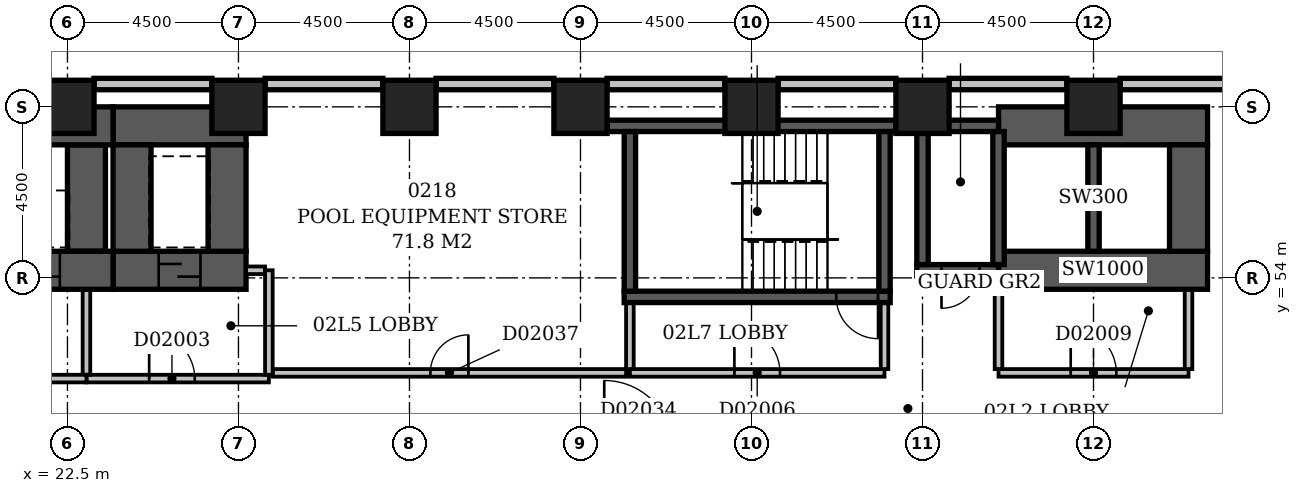
"""IFC4 building model, lengths in metres.
Left out: names, types, materials, properties, quantities, classifications, styles, units other than length and angle.
Written with IfcOpenShell. Run it as: python <this file> out.ifc"""

import sys

from ifc_helpers import new_model, si_unit, direction, frame, frame_2d, origin, origin_2d, place, context, subcontext, project, spatial, rectangle, extrude, element, fill, save


model = new_model("IFC4")
c1 = context("Model", 3, precision=1e-05, world=origin(), true_north=direction((0.0, 1.0)))
c2 = subcontext(c1, "Body", "Model", "MODEL_VIEW")
j1 = project(units=[si_unit("LENGTHUNIT", "METRE"), si_unit("PLANEANGLEUNIT", "RADIAN")], contexts=[c1])
p1 = place(None, origin())
s1 = spatial("IfcSite", under=j1, at=p1, CompositionType="ELEMENT")
p2 = place(p1, origin())
s2 = spatial("IfcBuilding", under=s1, at=p2, CompositionType="ELEMENT")
p3 = place(p2, frame((0.0, 0.0, 14.0)))
s3 = spatial("IfcBuildingStorey", under=s2, at=p3, CompositionType="ELEMENT", Elevation=14.0)
p4 = place(p3, frame((7.35, 54.2, -0.4), z_axis=(0.0, 0.0, 1.0), x_axis=(1.0, 0.0, 0.0)))
e1 = element("IfcWall", 1, at=p4, inside=s3, PredefinedType="SHEAR", context=c2, shape_type="SweptSolid", body=[
    extrude(rectangle(XDim=16.35, YDim=1.0, at=frame_2d((8.175, 0.0))), origin(), (0.0, 0.0, 1.0), 5.0),
])
p5 = place(p4, frame((1.35, 0.0, 0.4)))
e2 = element("IfcOpeningElement", 2, at=p5, cuts=e1, PredefinedType="OPENING", context=c2, shape_type="SweptSolid", body=[
    extrude(rectangle(XDim=1.1, YDim=2.1, at=frame_2d((0.55, 1.05))), frame((0.0, 0.512, 0.0), z_axis=(0.0, -1.0, 0.0), x_axis=(1.0, 0.0, 0.0)), (0.0, 0.0, 1.0), 1.024),
])
p6 = place(p4, frame((3.85, 0.0, 0.4)))
e3 = element("IfcOpeningElement", 3, at=p6, cuts=e1, PredefinedType="OPENING", context=c2, shape_type="SweptSolid", body=[
    extrude(rectangle(XDim=1.1, YDim=2.1, at=frame_2d((0.55, 1.05))), frame((0.0, 0.512, 0.0), z_axis=(0.0, -1.0, 0.0), x_axis=(1.0, 0.0, 0.0)), (0.0, 0.0, 1.0), 1.024),
])
p7 = place(p4, frame((6.35, 0.0, 0.4)))
e4 = element("IfcOpeningElement", 4, at=p7, cuts=e1, PredefinedType="OPENING", context=c2, shape_type="SweptSolid", body=[
    extrude(rectangle(XDim=1.1, YDim=2.1, at=frame_2d((0.55, 1.05))), frame((0.0, 0.512, 0.0), z_axis=(0.0, -1.0, 0.0), x_axis=(1.0, 0.0, 0.0)), (0.0, 0.0, 1.0), 1.024),
])
p8 = place(p4, frame((8.85, 0.0, 0.4)))
e5 = element("IfcOpeningElement", 5, at=p8, cuts=e1, PredefinedType="OPENING", context=c2, shape_type="SweptSolid", body=[
    extrude(rectangle(XDim=1.1, YDim=2.1, at=frame_2d((0.55, 1.05))), frame((0.0, 0.512, 0.0), z_axis=(0.0, -1.0, 0.0), x_axis=(1.0, 0.0, 0.0)), (0.0, 0.0, 1.0), 1.024),
])
p9 = place(p4, frame((11.35, 0.0, 0.4)))
e6 = element("IfcOpeningElement", 6, at=p9, cuts=e1, PredefinedType="OPENING", context=c2, shape_type="SweptSolid", body=[
    extrude(rectangle(XDim=1.1, YDim=2.1, at=frame_2d((0.55, 1.05))), frame((0.0, 0.512, 0.0), z_axis=(0.0, -1.0, 0.0), x_axis=(1.0, 0.0, 0.0)), (0.0, 0.0, 1.0), 1.024),
])
p10 = place(p4, frame((13.85, 0.0, 0.4)))
e7 = element("IfcOpeningElement", 7, at=p10, cuts=e1, PredefinedType="OPENING", context=c2, shape_type="SweptSolid", body=[
    extrude(rectangle(XDim=1.1, YDim=2.1, at=frame_2d((0.55, 1.05))), frame((0.0, 0.512, 0.0), z_axis=(0.0, -1.0, 0.0), x_axis=(1.0, 0.0, 0.0)), (0.0, 0.0, 1.0), 1.024),
])
p11 = place(p3, frame((7.35, 58.0, -0.4), z_axis=(0.0, 0.0, 1.0), x_axis=(1.0, 0.0, 0.0)))
e8 = element("IfcWall", 8, at=p11, inside=s3, PredefinedType="SHEAR", context=c2, shape_type="SweptSolid", body=[
    extrude(rectangle(XDim=16.35, YDim=1.0, at=frame_2d((8.175, 0.0))), origin(), (0.0, 0.0, 1.0), 5.0),
])
p12 = place(p3, frame((23.0, 54.7, -0.4), z_axis=(0.0, 0.0, 1.0), x_axis=(0.0, 1.0, 0.0)))
e9 = element("IfcWall", 9, at=p12, inside=s3, PredefinedType="SHEAR", context=c2, shape_type="SweptSolid", body=[
    extrude(rectangle(XDim=2.8, YDim=1.0, at=frame_2d((1.4, 0.0))), origin(), (0.0, 0.0, 1.0), 5.0),
])
p13 = place(p3, frame((23.7, 54.2, -0.4), z_axis=(0.0, 0.0, 1.0), x_axis=(1.0, 0.0, 0.0)))
e10 = element("IfcWall", 10, at=p13, inside=s3, PredefinedType="SHEAR", context=c2, shape_type="SweptSolid", body=[
    extrude(rectangle(XDim=3.5, YDim=1.0, at=frame_2d((1.75, 0.0))), origin(), (0.0, 0.0, 1.0), 5.0),
])
p14 = place(p13, frame((1.2, 0.0, 0.4)))
e11 = element("IfcOpeningElement", 11, at=p14, cuts=e10, PredefinedType="OPENING", context=c2, shape_type="SweptSolid", body=[
    extrude(rectangle(XDim=1.1, YDim=2.1, at=frame_2d((0.55, 1.05))), frame((0.0, 0.512, 0.0), z_axis=(0.0, -1.0, 0.0), x_axis=(1.0, 0.0, 0.0)), (0.0, 0.0, 1.0), 1.024),
])
p15 = place(p3, frame((23.7, 58.0, -0.4), z_axis=(0.0, 0.0, 1.0), x_axis=(1.0, 0.0, 0.0)))
e12 = element("IfcWall", 12, at=p15, inside=s3, PredefinedType="SHEAR", context=c2, shape_type="SweptSolid", body=[
    extrude(rectangle(XDim=3.5, YDim=1.0, at=frame_2d((1.75, 0.0))), origin(), (0.0, 0.0, 1.0), 5.0),
])
for number, where, z_axis, x_axis in (
    (13, (24.2, 54.7, -0.4), (0.0, 0.0, 1.0), (0.0, 1.0, 0.0)),
    (14, (26.7, 54.7, -0.4), (0.0, 0.0, 1.0), (0.0, 1.0, 0.0)),
):
    element("IfcWall", number, at=place(p3, frame(where, z_axis=z_axis, x_axis=x_axis)), inside=s3, PredefinedType="SHEAR", context=c2, shape_type="SweptSolid", body=[
        extrude(rectangle(XDim=2.8, YDim=1.0, at=frame_2d((1.4, 0.0))), origin(), (0.0, 0.0, 1.0), 5.0),
    ])
p16 = place(p3, frame((36.7, 58.0, -0.4), z_axis=(0.0, 0.0, 1.0), x_axis=(1.0, 0.0, 0.0)))
e15 = element("IfcWall", 15, at=p16, inside=s3, PredefinedType="SHEAR", context=c2, shape_type="SweptSolid", body=[
    extrude(rectangle(XDim=7.6, YDim=0.3, at=frame_2d((3.8, 0.0))), origin(), (0.0, 0.0, 1.0), 5.0),
])
p17 = place(p3, frame((37.15, 53.5, -0.4), z_axis=(0.0, 0.0, 1.0), x_axis=(1.0, 0.0, 0.0)))
e16 = element("IfcWall", 16, at=p17, inside=s3, PredefinedType="SHEAR", context=c2, shape_type="SweptSolid", body=[
    extrude(rectangle(XDim=7.0, YDim=0.3, at=frame_2d((3.5, 0.0))), origin(), (0.0, 0.0, 1.0), 5.0),
])
p18 = place(p17, frame((5.58, 0.0, 0.4)))
e17 = element("IfcOpeningElement", 17, at=p18, cuts=e16, PredefinedType="OPENING", context=c2, shape_type="SweptSolid", body=[
    extrude(rectangle(XDim=1.1, YDim=2.1, at=frame_2d((0.55, 1.05))), frame((0.0, 0.162, 0.0), z_axis=(0.0, -1.0, 0.0), x_axis=(1.0, 0.0, 0.0)), (0.0, 0.0, 1.0), 0.324),
])
for number, where, z_axis, x_axis in (
    (18, (37.3, 53.65, -0.4), (0.0, 0.0, 1.0), (0.0, 1.0, 0.0)),
    (19, (44.0, 53.65, -0.4), (0.0, 0.0, 1.0), (0.0, 1.0, 0.0)),
):
    element("IfcWall", number, at=place(p3, frame(where, z_axis=z_axis, x_axis=x_axis)), inside=s3, PredefinedType="SHEAR", context=c2, shape_type="SweptSolid", body=[
        extrude(rectangle(XDim=4.2, YDim=0.3, at=frame_2d((2.1, 0.0))), origin(), (0.0, 0.0, 1.0), 5.0),
    ])
p19 = place(p3, frame((44.85, 54.2, -0.4), z_axis=(0.0, 0.0, 1.0), x_axis=(1.0, 0.0, 0.0)))
e20 = element("IfcWall", 20, at=p19, inside=s3, PredefinedType="SHEAR", context=c2, shape_type="SweptSolid", body=[
    extrude(rectangle(XDim=2.15, YDim=0.3, at=frame_2d((1.075, 0.0))), origin(), (0.0, 0.0, 1.0), 5.0),
])
p20 = place(p19, frame((0.65, 0.0, 0.4)))
e21 = element("IfcOpeningElement", 21, at=p20, cuts=e20, PredefinedType="OPENING", context=c2, shape_type="SweptSolid", body=[
    extrude(rectangle(XDim=1.0, YDim=2.1, at=frame_2d((0.5, 1.05))), frame((0.0, 0.162, 0.0), z_axis=(0.0, -1.0, 0.0), x_axis=(1.0, 0.0, 0.0)), (0.0, 0.0, 1.0), 0.324),
])
p21 = place(p3, frame((44.85, 58.0, -0.4), z_axis=(0.0, 0.0, 1.0), x_axis=(1.0, 0.0, 0.0)))
e22 = element("IfcWall", 22, at=p21, inside=s3, PredefinedType="SHEAR", context=c2, shape_type="SweptSolid", body=[
    extrude(rectangle(XDim=2.15, YDim=0.3, at=frame_2d((1.075, 0.0))), origin(), (0.0, 0.0, 1.0), 5.0),
])
p22 = place(p3, frame((45.0, 54.35, -0.4), z_axis=(0.0, 0.0, 1.0), x_axis=(0.0, 1.0, 0.0)))
e23 = element("IfcWall", 23, at=p22, inside=s3, PredefinedType="SHEAR", context=c2, shape_type="SweptSolid", body=[
    extrude(rectangle(XDim=3.5, YDim=0.3, at=frame_2d((1.75, 0.0))), origin(), (0.0, 0.0, 1.0), 5.0),
])
p23 = place(p3, frame((47.0, 54.2, -0.4), z_axis=(0.0, 0.0, 1.0), x_axis=(1.0, 0.0, 0.0)))
e24 = element("IfcWall", 24, at=p23, inside=s3, PredefinedType="SHEAR", context=c2, shape_type="SweptSolid", body=[
    extrude(rectangle(XDim=5.5, YDim=1.0, at=frame_2d((2.75, 0.0))), origin(), (0.0, 0.0, 1.0), 5.0),
])
p24 = place(p3, frame((47.0, 54.35, -0.4), z_axis=(0.0, 0.0, 1.0), x_axis=(0.0, 1.0, 0.0)))
e25 = element("IfcWall", 25, at=p24, inside=s3, PredefinedType="SHEAR", context=c2, shape_type="SweptSolid", body=[
    extrude(rectangle(XDim=3.5, YDim=0.3, at=frame_2d((1.75, 0.0))), origin(), (0.0, 0.0, 1.0), 5.0),
])
p25 = place(p3, frame((47.0, 58.0, -0.4), z_axis=(0.0, 0.0, 1.0), x_axis=(1.0, 0.0, 0.0)))
e26 = element("IfcWall", 26, at=p25, inside=s3, PredefinedType="SHEAR", context=c2, shape_type="SweptSolid", body=[
    extrude(rectangle(XDim=5.5, YDim=1.0, at=frame_2d((2.75, 0.0))), origin(), (0.0, 0.0, 1.0), 5.0),
])
p26 = place(p3, frame((49.5, 54.7, -0.4), z_axis=(0.0, 0.0, 1.0), x_axis=(0.0, 1.0, 0.0)))
e27 = element("IfcWall", 27, at=p26, inside=s3, PredefinedType="SHEAR", context=c2, shape_type="SweptSolid", body=[
    extrude(rectangle(XDim=2.8, YDim=0.3, at=frame_2d((1.4, 0.0))), origin(), (0.0, 0.0, 1.0), 5.0),
])
p27 = place(p3, frame((52.0, 54.7, -0.4), z_axis=(0.0, 0.0, 1.0), x_axis=(0.0, 1.0, 0.0)))
e28 = element("IfcWall", 28, at=p27, inside=s3, PredefinedType="SHEAR", context=c2, shape_type="SweptSolid", body=[
    extrude(rectangle(XDim=2.8, YDim=1.0, at=frame_2d((1.4, 0.0))), origin(), (0.0, 0.0, 1.0), 5.0),
])
for number, where, z_axis, x_axis in (
    (29, (22.5, 58.5, -0.4), (0.0, 0.0, 1.0), (1.0, 0.0, 0.0)),
    (30, (27.0, 58.5, -0.4), (0.0, 0.0, 1.0), (1.0, 0.0, 0.0)),
    (31, (31.5, 58.5, -0.4), (0.0, 0.0, 1.0), (1.0, 0.0, 0.0)),
    (32, (36.0, 58.5, -0.4), (0.0, 0.0, 1.0), (1.0, 0.0, 0.0)),
    (33, (40.5, 58.5, -0.4), (0.0, 0.0, 1.0), (1.0, 0.0, 0.0)),
    (34, (45.0, 58.5, -0.4), (0.0, 0.0, 1.0), (1.0, 0.0, 0.0)),
    (35, (49.5, 58.5, -0.4), (0.0, 0.0, 1.0), (1.0, 0.0, 0.0)),
):
    element("IfcColumn", number, at=place(p3, frame(where, z_axis=z_axis, x_axis=x_axis)), inside=s3, PredefinedType="COLUMN", context=c2, shape_type="SweptSolid", body=[
        extrude(rectangle(XDim=1.4, YDim=1.4, at=origin_2d()), origin(), (0.0, 0.0, 1.0), 5.0),
    ])
for number, where, z_axis, x_axis in (
    (36, (53.3, 59.1, 0.0), (0.0, 0.0, 1.0), (-1.0, 0.0, 0.0)),
    (37, (48.8, 59.1, 0.0), (0.0, 0.0, 1.0), (-1.0, 0.0, 0.0)),
    (38, (44.3, 59.1, 0.0), (0.0, 0.0, 1.0), (-1.0, 0.0, 0.0)),
    (39, (39.8, 59.1, 0.0), (0.0, 0.0, 1.0), (-1.0, 0.0, 0.0)),
    (40, (35.3, 59.1, 0.0), (0.0, 0.0, 1.0), (-1.0, 0.0, 0.0)),
    (41, (30.8, 59.1, 0.0), (0.0, 0.0, 1.0), (-1.0, 0.0, 0.0)),
    (42, (26.3, 59.1, 0.0), (0.0, 0.0, 1.0), (-1.0, 0.0, 0.0)),
):
    element("IfcWall", number, at=place(p3, frame(where, z_axis=z_axis, x_axis=x_axis)), inside=s3, PredefinedType="STANDARD", context=c2, shape_type="SweptSolid", body=[
        extrude(rectangle(XDim=3.1, YDim=0.3, at=frame_2d((1.55, 0.0))), origin(), (0.0, 0.0, 1.0), 3.9),
    ])
p28 = place(p3, frame((8.0, 51.35, 0.0), z_axis=(0.0, 0.0, 1.0), x_axis=(1.0, 0.0, 0.0)))
e43 = element("IfcWall", 43, at=p28, inside=s3, PredefinedType="PARTITIONING", context=c2, shape_type="SweptSolid", body=[
    extrude(rectangle(XDim=15.0, YDim=0.2, at=frame_2d((7.5, 0.0))), origin(), (0.0, 0.0, 1.0), 4.6),
])
p29 = place(p28, frame((3.4, 0.0, 0.0)))
e44 = element("IfcOpeningElement", 44, at=p29, cuts=e43, PredefinedType="OPENING", context=c2, shape_type="SweptSolid", body=[
    extrude(rectangle(XDim=1.2, YDim=2.1, at=frame_2d((0.6, 1.05))), frame((0.0, 0.112, 0.0), z_axis=(0.0, -1.0, 0.0), x_axis=(1.0, 0.0, 0.0)), (0.0, 0.0, 1.0), 0.224),
])
p30 = place(p28, frame((9.4, 0.0, 0.0)))
e45 = element("IfcOpeningElement", 45, at=p30, cuts=e43, PredefinedType="OPENING", context=c2, shape_type="SweptSolid", body=[
    extrude(rectangle(XDim=1.2, YDim=2.1, at=frame_2d((0.6, 1.05))), frame((0.0, 0.112, 0.0), z_axis=(0.0, -1.0, 0.0), x_axis=(1.0, 0.0, 0.0)), (0.0, 0.0, 1.0), 0.224),
])
p31 = place(p3, frame((23.0, 51.45, 0.0), z_axis=(0.0, 0.0, 1.0), x_axis=(0.0, 1.0, 0.0)))
e46 = element("IfcWall", 46, at=p31, inside=s3, PredefinedType="PARTITIONING", context=c2, shape_type="SweptSolid", body=[
    extrude(rectangle(XDim=2.23, YDim=0.2, at=frame_2d((1.115, 0.0))), origin(), (0.0, 0.0, 1.0), 4.6),
])
p32 = place(p3, frame((47.0, 51.5, 0.0), z_axis=(0.0, 0.0, 1.0), x_axis=(1.0, 0.0, 0.0)))
e47 = element("IfcWall", 47, at=p32, inside=s3, PredefinedType="PARTITIONING", context=c2, shape_type="SweptSolid", body=[
    extrude(rectangle(XDim=5.0, YDim=0.2, at=frame_2d((2.5, 0.0))), origin(), (0.0, 0.0, 1.0), 4.6),
])
p33 = place(p32, frame((1.9, 0.0, 0.0)))
e48 = element("IfcOpeningElement", 48, at=p33, cuts=e47, PredefinedType="OPENING", context=c2, shape_type="SweptSolid", body=[
    extrude(rectangle(XDim=1.2, YDim=2.1, at=frame_2d((0.6, 1.05))), frame((0.0, 0.112, 0.0), z_axis=(0.0, -1.0, 0.0), x_axis=(1.0, 0.0, 0.0)), (0.0, 0.0, 1.0), 0.224),
])
for number, where, z_axis, x_axis in (
    (49, (52.0, 51.6, 0.0), (0.0, 0.0, 1.0), (0.0, 1.0, 0.0)),
    (50, (47.0, 51.6, 0.0), (0.0, 0.0, 1.0), (0.0, 1.0, 0.0)),
):
    element("IfcWall", number, at=place(p3, frame(where, z_axis=z_axis, x_axis=x_axis)), inside=s3, PredefinedType="PARTITIONING", context=c2, shape_type="SweptSolid", body=[
        extrude(rectangle(XDim=2.08, YDim=0.2, at=frame_2d((1.04, 0.0))), origin(), (0.0, 0.0, 1.0), 4.6),
    ])
p34 = place(p3, frame((23.0, 51.35, 0.0), z_axis=(0.0, 0.0, 1.0), x_axis=(1.0, 0.0, 0.0)))
e51 = element("IfcWall", 51, at=p34, inside=s3, PredefinedType="PARTITIONING", context=c2, shape_type="SweptSolid", body=[
    extrude(rectangle(XDim=4.8, YDim=0.2, at=frame_2d((2.4, 0.0))), origin(), (0.0, 0.0, 1.0), 4.6),
])
p35 = place(p34, frame((1.65, 0.0, 0.0)))
e52 = element("IfcOpeningElement", 52, at=p35, cuts=e51, PredefinedType="OPENING", context=c2, shape_type="SweptSolid", body=[
    extrude(rectangle(XDim=1.2, YDim=2.1, at=frame_2d((0.6, 1.05))), frame((0.0, 0.112, 0.0), z_axis=(0.0, -1.0, 0.0), x_axis=(1.0, 0.0, 0.0)), (0.0, 0.0, 1.0), 0.224),
])
p36 = place(p3, frame((27.8, 51.45, 0.0), z_axis=(0.0, 0.0, 1.0), x_axis=(0.0, 1.0, 0.0)))
e53 = element("IfcWall", 53, at=p36, inside=s3, PredefinedType="PARTITIONING", context=c2, shape_type="SweptSolid", body=[
    extrude(rectangle(XDim=2.75, YDim=0.2, at=frame_2d((1.375, 0.0))), origin(), (0.0, 0.0, 1.0), 4.6),
])
p37 = place(p3, frame((27.2, 54.2, 0.0), z_axis=(0.0, 0.0, 1.0), x_axis=(1.0, 0.0, 0.0)))
e54 = element("IfcWall", 54, at=p37, inside=s3, PredefinedType="PARTITIONING", context=c2, shape_type="SweptSolid", body=[
    extrude(rectangle(XDim=0.5, YDim=0.2, at=frame_2d((0.25, 0.0))), origin(), (0.0, 0.0, 1.0), 4.6),
])
p38 = place(p3, frame((37.3, 51.5, 0.0), z_axis=(0.0, 0.0, 1.0), x_axis=(1.0, 0.0, 0.0)))
e55 = element("IfcWall", 55, at=p38, inside=s3, PredefinedType="PARTITIONING", context=c2, shape_type="SweptSolid", body=[
    extrude(rectangle(XDim=6.7, YDim=0.2, at=frame_2d((3.35, 0.0))), origin(), (0.0, 0.0, 1.0), 4.6),
])
p39 = place(p38, frame((2.75, 0.0, 0.0)))
e56 = element("IfcOpeningElement", 56, at=p39, cuts=e55, PredefinedType="OPENING", context=c2, shape_type="SweptSolid", body=[
    extrude(rectangle(XDim=1.2, YDim=2.1, at=frame_2d((0.6, 1.05))), frame((0.0, 0.112, 0.0), z_axis=(0.0, -1.0, 0.0), x_axis=(1.0, 0.0, 0.0)), (0.0, 0.0, 1.0), 0.224),
])
for number, where, z_axis, x_axis in (
    (57, (44.0, 51.6, 0.0), (0.0, 0.0, 1.0), (0.0, 1.0, 0.0)),
    (58, (37.3, 51.6, 0.0), (0.0, 0.0, 1.0), (0.0, 1.0, 0.0)),
):
    element("IfcWall", number, at=place(p3, frame(where, z_axis=z_axis, x_axis=x_axis)), inside=s3, PredefinedType="PARTITIONING", context=c2, shape_type="SweptSolid", body=[
        extrude(rectangle(XDim=1.73, YDim=0.2, at=frame_2d((0.865, 0.0))), origin(), (0.0, 0.0, 1.0), 4.6),
    ])
p40 = place(p3, frame((37.2, 51.5, 0.0), z_axis=(0.0, 0.0, 1.0), x_axis=(-1.0, 0.0, 0.0)))
e59 = element("IfcWall", 59, at=p40, inside=s3, PredefinedType="PARTITIONING", context=c2, shape_type="SweptSolid", body=[
    extrude(rectangle(XDim=9.3, YDim=0.2, at=frame_2d((4.65, 0.0))), origin(), (0.0, 0.0, 1.0), 4.6),
])
p41 = place(p40, frame((4.15, 0.0, 0.0)))
e60 = element("IfcOpeningElement", 60, at=p41, cuts=e59, PredefinedType="OPENING", context=c2, shape_type="SweptSolid", body=[
    extrude(rectangle(XDim=1.0, YDim=2.1, at=frame_2d((0.5, 1.05))), frame((0.0, 0.112, 0.0), z_axis=(0.0, -1.0, 0.0), x_axis=(1.0, 0.0, 0.0)), (0.0, 0.0, 1.0), 0.224),
])
p42 = place(p35, origin())
e61 = element("IfcDoor", 61, at=p42, inside=s3, OperationType="SINGLE_SWING_LEFT", PredefinedType="DOOR", context=c2, shape_type="SweptSolid", body=[
    extrude(rectangle(XDim=1.2, YDim=2.1, at=frame_2d((0.6, 1.05))), frame((0.0, 0.025, 0.0), z_axis=(0.0, -1.0, 0.0), x_axis=(1.0, 0.0, 0.0)), (0.0, 0.0, 1.0), 0.05),
])
fill(e52, e61)
p43 = place(p14, origin())
e62 = element("IfcDoor", 62, at=p43, inside=s3, OperationType="SLIDING_TO_LEFT", PredefinedType="DOOR", context=c2, shape_type="SweptSolid", body=[
    extrude(rectangle(XDim=1.1, YDim=2.1, at=frame_2d((0.55, 1.05))), frame((0.0, 0.025, 0.0), z_axis=(0.0, -1.0, 0.0), x_axis=(1.0, 0.0, 0.0)), (0.0, 0.0, 1.0), 0.05),
])
fill(e11, e62)
p44 = place(p10, origin())
e63 = element("IfcDoor", 63, at=p44, inside=s3, OperationType="SLIDING_TO_LEFT", PredefinedType="DOOR", context=c2, shape_type="SweptSolid", body=[
    extrude(rectangle(XDim=1.1, YDim=2.1, at=frame_2d((0.55, 1.05))), frame((0.0, 0.025, 0.0), z_axis=(0.0, -1.0, 0.0), x_axis=(1.0, 0.0, 0.0)), (0.0, 0.0, 1.0), 0.05),
])
fill(e7, e63)
p45 = place(p39, origin())
e64 = element("IfcDoor", 64, at=p45, inside=s3, OperationType="SINGLE_SWING_LEFT", PredefinedType="DOOR", context=c2, shape_type="SweptSolid", body=[
    extrude(rectangle(XDim=1.2, YDim=2.1, at=frame_2d((0.6, 1.05))), frame((0.0, 0.025, 0.0), z_axis=(0.0, -1.0, 0.0), x_axis=(1.0, 0.0, 0.0)), (0.0, 0.0, 1.0), 0.05),
])
fill(e56, e64)
p46 = place(p33, origin())
e65 = element("IfcDoor", 65, at=p46, inside=s3, OperationType="SINGLE_SWING_LEFT", PredefinedType="DOOR", context=c2, shape_type="SweptSolid", body=[
    extrude(rectangle(XDim=1.2, YDim=2.1, at=frame_2d((0.6, 1.05))), frame((0.0, 0.025, 0.0), z_axis=(0.0, -1.0, 0.0), x_axis=(1.0, 0.0, 0.0)), (0.0, 0.0, 1.0), 0.05),
])
fill(e48, e65)
p47 = place(p20, frame((1.0, 0.0, 0.0), z_axis=(0.0, 0.0, 1.0), x_axis=(-1.0, 0.0, 0.0)))
e66 = element("IfcDoor", 66, at=p47, inside=s3, OperationType="SINGLE_SWING_RIGHT", PredefinedType="DOOR", context=c2, shape_type="SweptSolid", body=[
    extrude(rectangle(XDim=1.0, YDim=2.1, at=frame_2d((0.5, 1.05))), frame((0.0, 0.025, 0.0), z_axis=(0.0, -1.0, 0.0), x_axis=(1.0, 0.0, 0.0)), (0.0, 0.0, 1.0), 0.05),
])
fill(e21, e66)
p48 = place(p18, origin())
e67 = element("IfcDoor", 67, at=p48, inside=s3, OperationType="SINGLE_SWING_RIGHT", PredefinedType="DOOR", context=c2, shape_type="SweptSolid", body=[
    extrude(rectangle(XDim=1.1, YDim=2.1, at=frame_2d((0.55, 1.05))), frame((0.0, 0.025, 0.0), z_axis=(0.0, -1.0, 0.0), x_axis=(1.0, 0.0, 0.0)), (0.0, 0.0, 1.0), 0.05),
])
fill(e17, e67)
p49 = place(p41, frame((1.0, 0.0, 0.0), z_axis=(0.0, 0.0, 1.0), x_axis=(-1.0, 0.0, 0.0)))
e68 = element("IfcDoor", 68, at=p49, inside=s3, OperationType="SINGLE_SWING_RIGHT", PredefinedType="DOOR", context=c2, shape_type="SweptSolid", body=[
    extrude(rectangle(XDim=1.0, YDim=2.1, at=frame_2d((0.5, 1.05))), frame((0.0, 0.025, 0.0), z_axis=(0.0, -1.0, 0.0), x_axis=(1.0, 0.0, 0.0)), (0.0, 0.0, 1.0), 0.05),
])
fill(e60, e68)
save(model, sys.argv[1])
